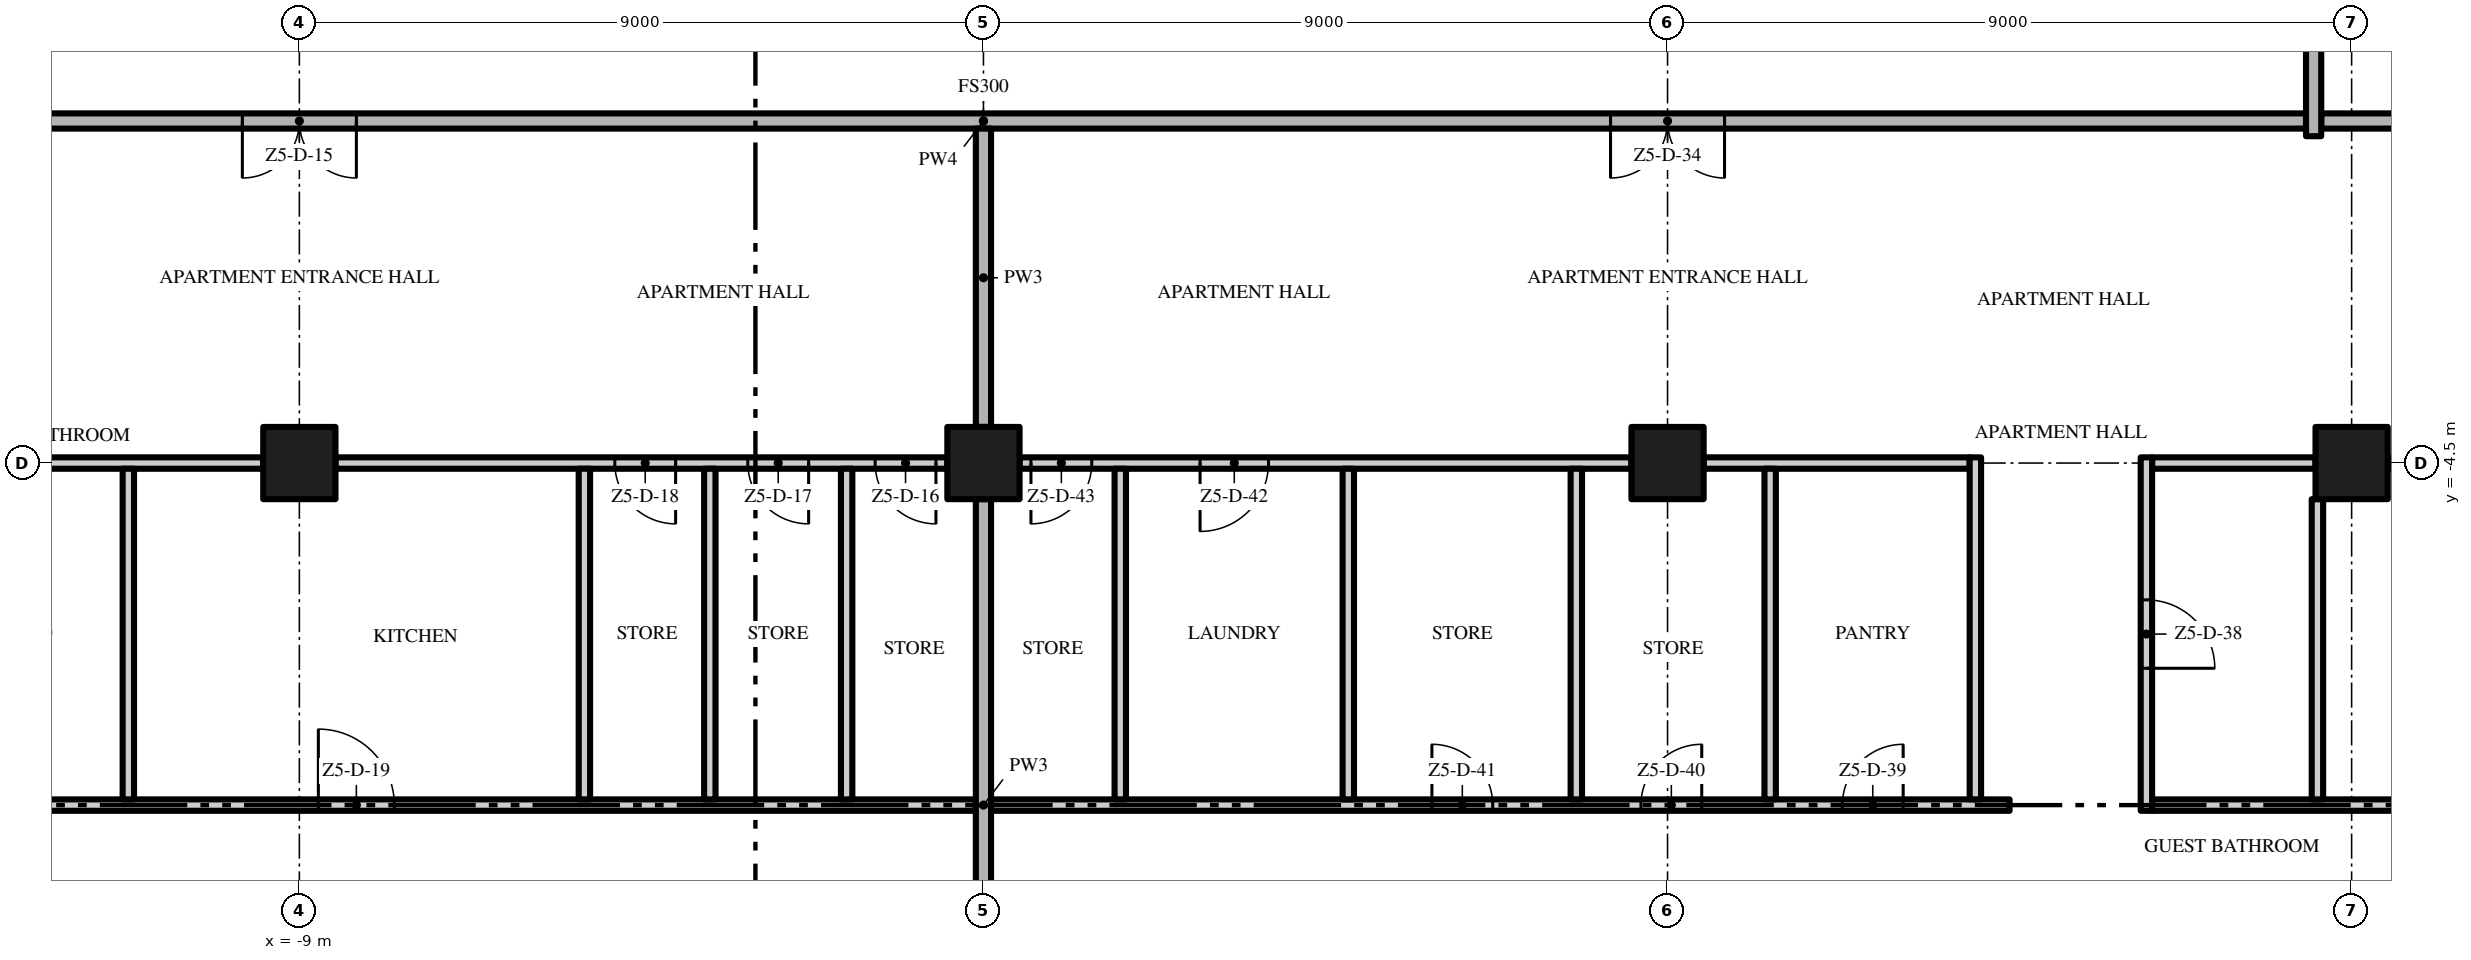
"""IFC4 building model, lengths in metres.
Left out: names, types, materials, properties, quantities, classifications, styles, units other than length and angle.
Written with IfcOpenShell. Run it as: python <this file> out.ifc"""

import sys

from ifc_helpers import new_model, si_unit, direction, frame, frame_2d, origin, origin_2d, place, context, subcontext, project, spatial, rectangle, extrude, element, fill, save


model = new_model("IFC4")
c1 = context("Model", 3, precision=1e-05, world=origin(), true_north=direction((0.0, 1.0)))
c2 = subcontext(c1, "Body", "Model", "MODEL_VIEW")
j1 = project(units=[si_unit("LENGTHUNIT", "METRE"), si_unit("PLANEANGLEUNIT", "RADIAN")], contexts=[c1])
p1 = place(None, origin())
s1 = spatial("IfcSite", under=j1, at=p1, CompositionType="ELEMENT")
p2 = place(p1, origin())
s2 = spatial("IfcBuilding", under=s1, at=p2, CompositionType="ELEMENT")
p3 = place(p2, frame((0.0, 0.0, 273.0)))
s3 = spatial("IfcBuildingStorey", under=s2, at=p3, CompositionType="ELEMENT", Elevation=273.0)
for number, where, z_axis, x_axis in (
    (1, (-9.0, -4.5, 0.0), (0.0, 0.0, 1.0), (1.0, 0.0, 0.0)),
    (2, (0.0, -4.5, 0.0), (0.0, 0.0, 1.0), (1.0, 0.0, 0.0)),
    (3, (18.0, -4.5, 0.0), (0.0, 0.0, 1.0), (1.0, 0.0, 0.0)),
    (4, (9.0, -4.5, 0.0), (0.0, 0.0, 1.0), (1.0, 0.0, 0.0)),
):
    element("IfcColumn", number, at=place(p3, frame(where, z_axis=z_axis, x_axis=x_axis)), inside=s3, PredefinedType="COLUMN", context=c2, shape_type="SweptSolid", body=[
        extrude(rectangle(XDim=0.95, YDim=0.95, at=origin_2d()), origin(), (0.0, 0.0, 1.0), 3.5),
    ])
p4 = place(p3, frame((-13.425, -9.0, 0.0), z_axis=(0.0, 0.0, 1.0), x_axis=(1.0, 0.0, 0.0)))
e5 = element("IfcWall", 5, at=p4, inside=s3, PredefinedType="PARTITIONING", context=c2, shape_type="SweptSolid", body=[
    extrude(rectangle(XDim=13.325, YDim=0.15, at=frame_2d((6.662, 0.0))), origin(), (0.0, 0.0, 1.0), 3.5),
])
p5 = place(p4, frame((4.675, 0.0, 0.0)))
e6 = element("IfcOpeningElement", 6, at=p5, cuts=e5, PredefinedType="OPENING", context=c2, shape_type="SweptSolid", body=[
    extrude(rectangle(XDim=1.0, YDim=2.4, at=frame_2d((0.5, 1.2))), frame((0.0, 0.085, 0.0), z_axis=(0.0, -1.0, 0.0), x_axis=(1.0, 0.0, 0.0)), (0.0, 0.0, 1.0), 0.17),
])
p6 = place(p3, frame((0.1, -9.0, 0.0), z_axis=(0.0, 0.0, 1.0), x_axis=(1.0, 0.0, 0.0)))
e7 = element("IfcWall", 7, at=p6, inside=s3, PredefinedType="PARTITIONING", context=c2, shape_type="SweptSolid", body=[
    extrude(rectangle(XDim=13.4, YDim=0.15, at=frame_2d((6.7, 0.0))), origin(), (0.0, 0.0, 1.0), 3.5),
])
p7 = place(p6, frame((11.2, 0.0, 0.0)))
e8 = element("IfcOpeningElement", 8, at=p7, cuts=e7, PredefinedType="OPENING", context=c2, shape_type="SweptSolid", body=[
    extrude(rectangle(XDim=0.8, YDim=2.0, at=frame_2d((0.4, 1.0))), frame((0.0, 0.085, 0.0), z_axis=(0.0, -1.0, 0.0), x_axis=(1.0, 0.0, 0.0)), (0.0, 0.0, 1.0), 0.17),
])
p8 = place(p6, frame((8.55, 0.0, 0.0)))
e9 = element("IfcOpeningElement", 9, at=p8, cuts=e7, PredefinedType="OPENING", context=c2, shape_type="SweptSolid", body=[
    extrude(rectangle(XDim=0.8, YDim=2.0, at=frame_2d((0.4, 1.0))), frame((0.0, 0.085, 0.0), z_axis=(0.0, -1.0, 0.0), x_axis=(1.0, 0.0, 0.0)), (0.0, 0.0, 1.0), 0.17),
])
p9 = place(p6, frame((5.8, 0.0, 0.0)))
e10 = element("IfcOpeningElement", 10, at=p9, cuts=e7, PredefinedType="OPENING", context=c2, shape_type="SweptSolid", body=[
    extrude(rectangle(XDim=0.8, YDim=2.0, at=frame_2d((0.4, 1.0))), frame((0.0, 0.085, 0.0), z_axis=(0.0, -1.0, 0.0), x_axis=(1.0, 0.0, 0.0)), (0.0, 0.0, 1.0), 0.17),
])
p10 = place(p3, frame((15.375, -9.0, 0.0), z_axis=(0.0, 0.0, 1.0), x_axis=(1.0, 0.0, 0.0)))
e11 = element("IfcWall", 11, at=p10, inside=s3, PredefinedType="PARTITIONING", context=c2, shape_type="SweptSolid", body=[
    extrude(rectangle(XDim=11.325, YDim=0.15, at=frame_2d((5.662, 0.0))), origin(), (0.0, 0.0, 1.0), 3.5),
])
p11 = place(p10, frame((10.325, 0.0, 0.0)))
e12 = element("IfcOpeningElement", 12, at=p11, cuts=e11, PredefinedType="OPENING", context=c2, shape_type="SweptSolid", body=[
    extrude(rectangle(XDim=0.8, YDim=2.0, at=frame_2d((0.4, 1.0))), frame((0.0, 0.085, 0.0), z_axis=(0.0, -1.0, 0.0), x_axis=(1.0, 0.0, 0.0)), (0.0, 0.0, 1.0), 0.17),
])
p12 = place(p3, frame((-13.425, -4.5, 0.0), z_axis=(0.0, 0.0, 1.0), x_axis=(1.0, 0.0, 0.0)))
e13 = element("IfcWall", 13, at=p12, inside=s3, PredefinedType="PARTITIONING", context=c2, shape_type="SweptSolid", body=[
    extrude(rectangle(XDim=3.95, YDim=0.15, at=frame_2d((1.975, 0.0))), origin(), (0.0, 0.0, 1.0), 3.5),
])
p13 = place(p3, frame((-0.475, -4.5, 0.0), z_axis=(0.0, 0.0, 1.0), x_axis=(-1.0, 0.0, 0.0)))
e14 = element("IfcWall", 14, at=p13, inside=s3, PredefinedType="PARTITIONING", context=c2, shape_type="SweptSolid", body=[
    extrude(rectangle(XDim=8.05, YDim=0.15, at=frame_2d((4.025, 0.0))), origin(), (0.0, 0.0, 1.0), 3.5),
])
p14 = place(p13, frame((0.15, 0.0, 0.0)))
e15 = element("IfcOpeningElement", 15, at=p14, cuts=e14, PredefinedType="OPENING", context=c2, shape_type="SweptSolid", body=[
    extrude(rectangle(XDim=0.8, YDim=2.0, at=frame_2d((0.4, 1.0))), frame((0.0, 0.085, 0.0), z_axis=(0.0, -1.0, 0.0), x_axis=(1.0, 0.0, 0.0)), (0.0, 0.0, 1.0), 0.17),
])
p15 = place(p13, frame((1.825, 0.0, 0.0)))
e16 = element("IfcOpeningElement", 16, at=p15, cuts=e14, PredefinedType="OPENING", context=c2, shape_type="SweptSolid", body=[
    extrude(rectangle(XDim=0.8, YDim=2.0, at=frame_2d((0.4, 1.0))), frame((0.0, 0.085, 0.0), z_axis=(0.0, -1.0, 0.0), x_axis=(1.0, 0.0, 0.0)), (0.0, 0.0, 1.0), 0.17),
])
p16 = place(p13, frame((3.575, 0.0, 0.0)))
e17 = element("IfcOpeningElement", 17, at=p16, cuts=e14, PredefinedType="OPENING", context=c2, shape_type="SweptSolid", body=[
    extrude(rectangle(XDim=0.8, YDim=2.0, at=frame_2d((0.4, 1.0))), frame((0.0, 0.085, 0.0), z_axis=(0.0, -1.0, 0.0), x_axis=(1.0, 0.0, 0.0)), (0.0, 0.0, 1.0), 0.17),
])
p17 = place(p3, frame((8.525, -4.5, 0.0), z_axis=(0.0, 0.0, 1.0), x_axis=(-1.0, 0.0, 0.0)))
e18 = element("IfcWall", 18, at=p17, inside=s3, PredefinedType="PARTITIONING", context=c2, shape_type="SweptSolid", body=[
    extrude(rectangle(XDim=8.05, YDim=0.15, at=frame_2d((4.025, 0.0))), origin(), (0.0, 0.0, 1.0), 3.5),
])
p18 = place(p17, frame((4.775, 0.0, 0.0)))
e19 = element("IfcOpeningElement", 19, at=p18, cuts=e18, PredefinedType="OPENING", context=c2, shape_type="SweptSolid", body=[
    extrude(rectangle(XDim=0.9, YDim=2.1, at=frame_2d((0.45, 1.05))), frame((0.0, 0.085, 0.0), z_axis=(0.0, -1.0, 0.0), x_axis=(1.0, 0.0, 0.0)), (0.0, 0.0, 1.0), 0.17),
])
p19 = place(p17, frame((7.1, 0.0, 0.0)))
e20 = element("IfcOpeningElement", 20, at=p19, cuts=e18, PredefinedType="OPENING", context=c2, shape_type="SweptSolid", body=[
    extrude(rectangle(XDim=0.8, YDim=2.0, at=frame_2d((0.4, 1.0))), frame((0.0, 0.085, 0.0), z_axis=(0.0, -1.0, 0.0), x_axis=(1.0, 0.0, 0.0)), (0.0, 0.0, 1.0), 0.17),
])
p20 = place(p3, frame((9.475, -4.5, 0.0), z_axis=(0.0, 0.0, 1.0), x_axis=(1.0, 0.0, 0.0)))
e21 = element("IfcWall", 21, at=p20, inside=s3, PredefinedType="PARTITIONING", context=c2, shape_type="SweptSolid", body=[
    extrude(rectangle(XDim=3.5, YDim=0.15, at=frame_2d((1.75, 0.0))), origin(), (0.0, 0.0, 1.0), 3.5),
])
p21 = place(p3, frame((15.375, -4.5, 0.0), z_axis=(0.0, 0.0, 1.0), x_axis=(1.0, 0.0, 0.0)))
e22 = element("IfcWall", 22, at=p21, inside=s3, PredefinedType="PARTITIONING", context=c2, shape_type="SweptSolid", body=[
    extrude(rectangle(XDim=2.15, YDim=0.15, at=frame_2d((1.075, 0.0))), origin(), (0.0, 0.0, 1.0), 3.5),
])
p22 = place(p3, frame((26.1, -4.5, 0.0), z_axis=(0.0, 0.0, 1.0), x_axis=(-1.0, 0.0, 0.0)))
e23 = element("IfcWall", 23, at=p22, inside=s3, PredefinedType="PARTITIONING", context=c2, shape_type="SweptSolid", body=[
    extrude(rectangle(XDim=7.625, YDim=0.15, at=frame_2d((3.812, 0.0))), origin(), (0.0, 0.0, 1.0), 3.5),
])
p23 = place(p22, frame((1.35, 0.0, 0.0)))
e24 = element("IfcOpeningElement", 24, at=p23, cuts=e23, PredefinedType="OPENING", context=c2, shape_type="SweptSolid", body=[
    extrude(rectangle(XDim=0.8, YDim=2.0, at=frame_2d((0.4, 1.0))), frame((0.0, 0.085, 0.0), z_axis=(0.0, -1.0, 0.0), x_axis=(1.0, 0.0, 0.0)), (0.0, 0.0, 1.0), 0.17),
])
p24 = place(p22, frame((5.025, 0.0, 0.0)))
e25 = element("IfcOpeningElement", 25, at=p24, cuts=e23, PredefinedType="OPENING", context=c2, shape_type="SweptSolid", body=[
    extrude(rectangle(XDim=1.0, YDim=2.4, at=frame_2d((0.5, 1.2))), frame((0.0, 0.085, 0.0), z_axis=(0.0, -1.0, 0.0), x_axis=(1.0, 0.0, 0.0)), (0.0, 0.0, 1.0), 0.17),
])
p25 = place(p3, frame((17.4, 0.0, 0.0), z_axis=(0.0, 0.0, 1.0), x_axis=(-1.0, 0.0, 0.0)))
e26 = element("IfcWall", 26, at=p25, inside=s3, PredefinedType="PARTITIONING", context=c2, shape_type="SweptSolid", body=[
    extrude(rectangle(XDim=34.8, YDim=0.2, at=frame_2d((17.4, 0.0))), origin(), (0.0, 0.0, 1.0), 3.5),
])
p26 = place(p25, frame((25.65, 0.0, 0.0)))
e27 = element("IfcOpeningElement", 27, at=p26, cuts=e26, PredefinedType="OPENING", context=c2, shape_type="SweptSolid", body=[
    extrude(rectangle(XDim=1.5, YDim=2.4, at=frame_2d((0.75, 1.2))), frame((0.0, 0.11, 0.0), z_axis=(0.0, -1.0, 0.0), x_axis=(1.0, 0.0, 0.0)), (0.0, 0.0, 1.0), 0.22),
])
p27 = place(p25, frame((7.65, 0.0, 0.0)))
e28 = element("IfcOpeningElement", 28, at=p27, cuts=e26, PredefinedType="OPENING", context=c2, shape_type="SweptSolid", body=[
    extrude(rectangle(XDim=1.5, YDim=2.4, at=frame_2d((0.75, 1.2))), frame((0.0, 0.11, 0.0), z_axis=(0.0, -1.0, 0.0), x_axis=(1.0, 0.0, 0.0)), (0.0, 0.0, 1.0), 0.22),
])
p28 = place(p3, frame((17.6, 0.0, 0.0), z_axis=(0.0, 0.0, 1.0), x_axis=(1.0, 0.0, 0.0)))
e29 = element("IfcWall", 29, at=p28, inside=s3, PredefinedType="PARTITIONING", context=c2, shape_type="SweptSolid", body=[
    extrude(rectangle(XDim=9.1, YDim=0.2, at=frame_2d((4.55, 0.0))), origin(), (0.0, 0.0, 1.0), 3.5),
])
for number, where, z_axis, x_axis in (
    (30, (-11.25, -8.925, 0.0), (0.0, 0.0, 1.0), (0.0, 1.0, 0.0)),
    (31, (-5.25, -8.925, 0.0), (0.0, 0.0, 1.0), (0.0, 1.0, 0.0)),
    (32, (-3.6, -8.925, 0.0), (0.0, 0.0, 1.0), (0.0, 1.0, 0.0)),
    (33, (-1.8, -8.925, 0.0), (0.0, 0.0, 1.0), (0.0, 1.0, 0.0)),
):
    element("IfcWall", number, at=place(p3, frame(where, z_axis=z_axis, x_axis=x_axis)), inside=s3, PredefinedType="PARTITIONING", context=c2, shape_type="SweptSolid", body=[
        extrude(rectangle(XDim=4.35, YDim=0.15, at=frame_2d((2.175, 0.0))), origin(), (0.0, 0.0, 1.0), 3.5),
    ])
p29 = place(p3, frame((0.0, -13.025, 0.0), z_axis=(0.0, 0.0, 1.0), x_axis=(0.0, 1.0, 0.0)))
e34 = element("IfcWall", 34, at=p29, inside=s3, PredefinedType="PARTITIONING", context=c2, shape_type="SweptSolid", body=[
    extrude(rectangle(XDim=8.05, YDim=0.2, at=frame_2d((4.025, 0.0))), origin(), (0.0, 0.0, 1.0), 3.5),
])
p30 = place(p3, frame((0.0, -4.025, 0.0), z_axis=(0.0, 0.0, 1.0), x_axis=(0.0, 1.0, 0.0)))
e35 = element("IfcWall", 35, at=p30, inside=s3, PredefinedType="PARTITIONING", context=c2, shape_type="SweptSolid", body=[
    extrude(rectangle(XDim=3.925, YDim=0.2, at=frame_2d((1.962, 0.0))), origin(), (0.0, 0.0, 1.0), 3.5),
])
for number, where, z_axis, x_axis in (
    (36, (1.8, -8.925, 0.0), (0.0, 0.0, 1.0), (0.0, 1.0, 0.0)),
    (37, (4.8, -8.925, 0.0), (0.0, 0.0, 1.0), (0.0, 1.0, 0.0)),
    (38, (7.8, -8.925, 0.0), (0.0, 0.0, 1.0), (0.0, 1.0, 0.0)),
    (39, (10.35, -8.925, 0.0), (0.0, 0.0, 1.0), (0.0, 1.0, 0.0)),
):
    element("IfcWall", number, at=place(p3, frame(where, z_axis=z_axis, x_axis=x_axis)), inside=s3, PredefinedType="PARTITIONING", context=c2, shape_type="SweptSolid", body=[
        extrude(rectangle(XDim=4.35, YDim=0.15, at=frame_2d((2.175, 0.0))), origin(), (0.0, 0.0, 1.0), 3.5),
    ])
p31 = place(p3, frame((13.05, -8.925, 0.0), z_axis=(0.0, 0.0, 1.0), x_axis=(0.0, 1.0, 0.0)))
e40 = element("IfcWall", 40, at=p31, inside=s3, PredefinedType="PARTITIONING", context=c2, shape_type="SweptSolid", body=[
    extrude(rectangle(XDim=4.5, YDim=0.15, at=frame_2d((2.25, 0.0))), origin(), (0.0, 0.0, 1.0), 3.5),
])
p32 = place(p3, frame((15.3, -4.425, 0.0), z_axis=(0.0, 0.0, 1.0), x_axis=(0.0, -1.0, 0.0)))
e41 = element("IfcWall", 41, at=p32, inside=s3, PredefinedType="PARTITIONING", context=c2, shape_type="SweptSolid", body=[
    extrude(rectangle(XDim=4.65, YDim=0.15, at=frame_2d((2.325, 0.0))), origin(), (0.0, 0.0, 1.0), 3.5),
])
p33 = place(p32, frame((1.875, 0.0, 0.0)))
e42 = element("IfcOpeningElement", 42, at=p33, cuts=e41, PredefinedType="OPENING", context=c2, shape_type="SweptSolid", body=[
    extrude(rectangle(XDim=0.9, YDim=2.1, at=frame_2d((0.45, 1.05))), frame((0.0, 0.085, 0.0), z_axis=(0.0, -1.0, 0.0), x_axis=(1.0, 0.0, 0.0)), (0.0, 0.0, 1.0), 0.17),
])
p34 = place(p3, frame((17.5, -0.2, 0.0), z_axis=(0.0, 0.0, 1.0), x_axis=(0.0, 1.0, 0.0)))
e43 = element("IfcWall", 43, at=p34, inside=s3, PredefinedType="PARTITIONING", context=c2, shape_type="SweptSolid", body=[
    extrude(rectangle(XDim=4.225, YDim=0.2, at=frame_2d((2.112, 0.0))), origin(), (0.0, 0.0, 1.0), 3.5),
])
p35 = place(p3, frame((17.55, -8.925, 0.0), z_axis=(0.0, 0.0, 1.0), x_axis=(0.0, 1.0, 0.0)))
e44 = element("IfcWall", 44, at=p35, inside=s3, PredefinedType="PARTITIONING", context=c2, shape_type="SweptSolid", body=[
    extrude(rectangle(XDim=3.95, YDim=0.15, at=frame_2d((1.975, 0.0))), origin(), (0.0, 0.0, 1.0), 3.5),
])
p36 = place(p26, origin())
e45 = element("IfcDoor", 45, at=p36, inside=s3, OperationType="DOUBLE_DOOR_SINGLE_SWING", PredefinedType="DOOR", context=c2, shape_type="SweptSolid", body=[
    extrude(rectangle(XDim=1.5, YDim=2.4, at=frame_2d((0.75, 1.2))), frame((0.0, 0.025, 0.0), z_axis=(0.0, -1.0, 0.0), x_axis=(1.0, 0.0, 0.0)), (0.0, 0.0, 1.0), 0.05),
])
fill(e27, e45)
p37 = place(p14, origin())
e46 = element("IfcDoor", 46, at=p37, inside=s3, OperationType="SINGLE_SWING_LEFT", PredefinedType="DOOR", context=c2, shape_type="SweptSolid", body=[
    extrude(rectangle(XDim=0.8, YDim=2.0, at=frame_2d((0.4, 1.0))), frame((0.0, 0.025, 0.0), z_axis=(0.0, -1.0, 0.0), x_axis=(1.0, 0.0, 0.0)), (0.0, 0.0, 1.0), 0.05),
])
fill(e15, e46)
p38 = place(p15, origin())
e47 = element("IfcDoor", 47, at=p38, inside=s3, OperationType="SINGLE_SWING_LEFT", PredefinedType="DOOR", context=c2, shape_type="SweptSolid", body=[
    extrude(rectangle(XDim=0.8, YDim=2.0, at=frame_2d((0.4, 1.0))), frame((0.0, 0.025, 0.0), z_axis=(0.0, -1.0, 0.0), x_axis=(1.0, 0.0, 0.0)), (0.0, 0.0, 1.0), 0.05),
])
fill(e16, e47)
p39 = place(p16, origin())
e48 = element("IfcDoor", 48, at=p39, inside=s3, OperationType="SINGLE_SWING_LEFT", PredefinedType="DOOR", context=c2, shape_type="SweptSolid", body=[
    extrude(rectangle(XDim=0.8, YDim=2.0, at=frame_2d((0.4, 1.0))), frame((0.0, 0.025, 0.0), z_axis=(0.0, -1.0, 0.0), x_axis=(1.0, 0.0, 0.0)), (0.0, 0.0, 1.0), 0.05),
])
fill(e17, e48)
p40 = place(p5, origin())
e49 = element("IfcDoor", 49, at=p40, inside=s3, OperationType="SINGLE_SWING_LEFT", PredefinedType="DOOR", context=c2, shape_type="SweptSolid", body=[
    extrude(rectangle(XDim=1.0, YDim=2.4, at=frame_2d((0.5, 1.2))), frame((0.0, 0.025, 0.0), z_axis=(0.0, -1.0, 0.0), x_axis=(1.0, 0.0, 0.0)), (0.0, 0.0, 1.0), 0.05),
])
fill(e6, e49)
p41 = place(p27, origin())
e50 = element("IfcDoor", 50, at=p41, inside=s3, OperationType="DOUBLE_DOOR_SINGLE_SWING", PredefinedType="DOOR", context=c2, shape_type="SweptSolid", body=[
    extrude(rectangle(XDim=1.5, YDim=2.4, at=frame_2d((0.75, 1.2))), frame((0.0, 0.025, 0.0), z_axis=(0.0, -1.0, 0.0), x_axis=(1.0, 0.0, 0.0)), (0.0, 0.0, 1.0), 0.05),
])
fill(e28, e50)
p42 = place(p33, origin())
e51 = element("IfcDoor", 51, at=p42, inside=s3, OperationType="SINGLE_SWING_RIGHT", PredefinedType="DOOR", context=c2, shape_type="SweptSolid", body=[
    extrude(rectangle(XDim=0.9, YDim=2.1, at=frame_2d((0.45, 1.05))), frame((0.0, 0.025, 0.0), z_axis=(0.0, -1.0, 0.0), x_axis=(1.0, 0.0, 0.0)), (0.0, 0.0, 1.0), 0.05),
])
fill(e42, e51)
p43 = place(p7, origin())
e52 = element("IfcDoor", 52, at=p43, inside=s3, OperationType="SINGLE_SWING_RIGHT", PredefinedType="DOOR", context=c2, shape_type="SweptSolid", body=[
    extrude(rectangle(XDim=0.8, YDim=2.0, at=frame_2d((0.4, 1.0))), frame((0.0, 0.025, 0.0), z_axis=(0.0, -1.0, 0.0), x_axis=(1.0, 0.0, 0.0)), (0.0, 0.0, 1.0), 0.05),
])
fill(e8, e52)
p44 = place(p8, origin())
e53 = element("IfcDoor", 53, at=p44, inside=s3, OperationType="SINGLE_SWING_RIGHT", PredefinedType="DOOR", context=c2, shape_type="SweptSolid", body=[
    extrude(rectangle(XDim=0.8, YDim=2.0, at=frame_2d((0.4, 1.0))), frame((0.0, 0.025, 0.0), z_axis=(0.0, -1.0, 0.0), x_axis=(1.0, 0.0, 0.0)), (0.0, 0.0, 1.0), 0.05),
])
fill(e9, e53)
p45 = place(p9, origin())
e54 = element("IfcDoor", 54, at=p45, inside=s3, OperationType="SINGLE_SWING_LEFT", PredefinedType="DOOR", context=c2, shape_type="SweptSolid", body=[
    extrude(rectangle(XDim=0.8, YDim=2.0, at=frame_2d((0.4, 1.0))), frame((0.0, 0.025, 0.0), z_axis=(0.0, -1.0, 0.0), x_axis=(1.0, 0.0, 0.0)), (0.0, 0.0, 1.0), 0.05),
])
fill(e10, e54)
p46 = place(p18, origin())
e55 = element("IfcDoor", 55, at=p46, inside=s3, OperationType="SINGLE_SWING_RIGHT", PredefinedType="DOOR", context=c2, shape_type="SweptSolid", body=[
    extrude(rectangle(XDim=0.9, YDim=2.1, at=frame_2d((0.45, 1.05))), frame((0.0, 0.025, 0.0), z_axis=(0.0, -1.0, 0.0), x_axis=(1.0, 0.0, 0.0)), (0.0, 0.0, 1.0), 0.05),
])
fill(e19, e55)
p47 = place(p19, origin())
e56 = element("IfcDoor", 56, at=p47, inside=s3, OperationType="SINGLE_SWING_RIGHT", PredefinedType="DOOR", context=c2, shape_type="SweptSolid", body=[
    extrude(rectangle(XDim=0.8, YDim=2.0, at=frame_2d((0.4, 1.0))), frame((0.0, 0.025, 0.0), z_axis=(0.0, -1.0, 0.0), x_axis=(1.0, 0.0, 0.0)), (0.0, 0.0, 1.0), 0.05),
])
fill(e20, e56)
save(model, sys.argv[1])
